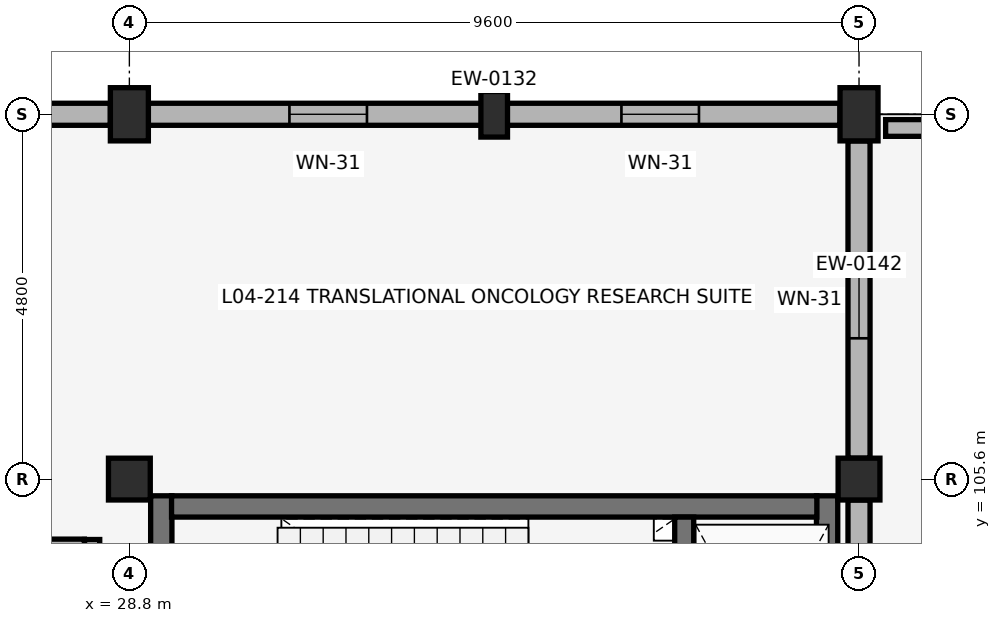
"""IFC4 building model, lengths in metres.
Left out: names, types, materials, properties, quantities, classifications, styles, units other than length and angle.
Written with IfcOpenShell. Run it as: python <this file> out.ifc"""

import sys

from ifc_helpers import new_model, si_unit, direction, frame, frame_2d, origin, origin_2d, place, context, subcontext, project, spatial, rectangle, extrude, element, fill, save


model = new_model("IFC4")
c1 = context("Model", 3, precision=1e-05, world=origin(), true_north=direction((0.0, 1.0)))
c2 = subcontext(c1, "Body", "Model", "MODEL_VIEW")
j1 = project(units=[si_unit("LENGTHUNIT", "METRE"), si_unit("PLANEANGLEUNIT", "RADIAN")], contexts=[c1])
p1 = place(None, origin())
s1 = spatial("IfcSite", under=j1, at=p1, CompositionType="ELEMENT")
p2 = place(p1, origin())
s2 = spatial("IfcBuilding", under=s1, at=p2, CompositionType="ELEMENT")
p3 = place(p2, frame((0.0, 0.0, 16.66)))
s3 = spatial("IfcBuildingStorey", under=s2, at=p3, CompositionType="ELEMENT", Elevation=16.66)
p4 = place(p3, frame((28.8, 105.6, 0.0), z_axis=(0.0, 0.0, 1.0), x_axis=(1.0, 0.0, 0.0)))
e1 = element("IfcColumn", 1, at=p4, inside=s3, PredefinedType="COLUMN", context=c2, shape_type="SweptSolid", body=[
    extrude(rectangle(XDim=0.55, YDim=0.55, at=origin_2d()), origin(), (0.0, 0.0, 1.0), 4.08),
])
p5 = place(p3, frame((28.8, 110.4, 0.0), z_axis=(0.0, 0.0, 1.0), x_axis=(1.0, 0.0, 0.0)))
e2 = element("IfcColumn", 2, at=p5, inside=s3, PredefinedType="COLUMN", context=c2, shape_type="SweptSolid", body=[
    extrude(rectangle(XDim=0.5, YDim=0.7, at=origin_2d()), origin(), (0.0, 0.0, 1.0), 4.08),
])
p6 = place(p3, frame((38.4, 105.6, 0.0), z_axis=(0.0, 0.0, 1.0), x_axis=(1.0, 0.0, 0.0)))
e3 = element("IfcColumn", 3, at=p6, inside=s3, PredefinedType="COLUMN", context=c2, shape_type="SweptSolid", body=[
    extrude(rectangle(XDim=0.55, YDim=0.55, at=origin_2d()), origin(), (0.0, 0.0, 1.0), 4.08),
])
p7 = place(p3, frame((38.4, 110.4, 0.0), z_axis=(0.0, 0.0, 1.0), x_axis=(1.0, 0.0, 0.0)))
e4 = element("IfcColumn", 4, at=p7, inside=s3, PredefinedType="COLUMN", context=c2, shape_type="SweptSolid", body=[
    extrude(rectangle(XDim=0.5, YDim=0.7, at=origin_2d()), origin(), (0.0, 0.0, 1.0), 4.08),
])
p8 = place(p3, frame((33.6, 110.4, 0.0), z_axis=(0.0, 0.0, 1.0), x_axis=(1.0, 0.0, 0.0)))
e5 = element("IfcColumn", 5, at=p8, inside=s3, PredefinedType="PILASTER", context=c2, shape_type="SweptSolid", body=[
    extrude(rectangle(XDim=0.35, YDim=0.6, at=origin_2d()), origin(), (0.0, 0.0, 1.0), 4.08),
])
p9 = place(p3, frame((28.55, 110.4, 0.0), z_axis=(0.0, 0.0, 1.0), x_axis=(-1.0, 0.0, 0.0)))
e6 = element("IfcWall", 6, at=p9, inside=s3, PredefinedType="SOLIDWALL", context=c2, shape_type="SweptSolid", body=[
    extrude(rectangle(XDim=9.1, YDim=0.29, at=frame_2d((4.55, 0.0))), origin(), (0.0, 0.0, 1.0), 3.08),
])
p10 = place(p9, frame((1.765, 0.0, 0.88)))
e7 = element("IfcOpeningElement", 7, at=p10, cuts=e6, PredefinedType="OPENING", context=c2, shape_type="SweptSolid", body=[
    extrude(rectangle(XDim=1.02, YDim=1.88, at=frame_2d((0.51, 0.94))), frame((0.0, 0.155, 0.0), z_axis=(0.0, -1.0, 0.0), x_axis=(1.0, 0.0, 0.0)), (0.0, 0.0, 1.0), 0.31),
])
p11 = place(p9, frame((4.04, 0.0, 0.88)))
e8 = element("IfcOpeningElement", 8, at=p11, cuts=e6, PredefinedType="OPENING", context=c2, shape_type="SweptSolid", body=[
    extrude(rectangle(XDim=1.02, YDim=1.88, at=frame_2d((0.51, 0.94))), frame((0.0, 0.155, 0.0), z_axis=(0.0, -1.0, 0.0), x_axis=(1.0, 0.0, 0.0)), (0.0, 0.0, 1.0), 0.31),
])
p12 = place(p9, frame((6.315, 0.0, 0.88)))
e9 = element("IfcOpeningElement", 9, at=p12, cuts=e6, PredefinedType="OPENING", context=c2, shape_type="SweptSolid", body=[
    extrude(rectangle(XDim=1.02, YDim=1.88, at=frame_2d((0.51, 0.94))), frame((0.0, 0.155, 0.0), z_axis=(0.0, -1.0, 0.0), x_axis=(1.0, 0.0, 0.0)), (0.0, 0.0, 1.0), 0.31),
])
p13 = place(p3, frame((38.15, 110.4, 0.0), z_axis=(0.0, 0.0, 1.0), x_axis=(-1.0, 0.0, 0.0)))
e10 = element("IfcWall", 10, at=p13, inside=s3, PredefinedType="SOLIDWALL", context=c2, shape_type="SweptSolid", body=[
    extrude(rectangle(XDim=9.1, YDim=0.29, at=frame_2d((4.55, 0.0))), origin(), (0.0, 0.0, 1.0), 3.08),
])
p14 = place(p13, frame((1.856, 0.0, 0.88)))
e11 = element("IfcOpeningElement", 11, at=p14, cuts=e10, PredefinedType="OPENING", context=c2, shape_type="SweptSolid", body=[
    extrude(rectangle(XDim=1.02, YDim=1.88, at=frame_2d((0.51, 0.94))), frame((0.0, 0.155, 0.0), z_axis=(0.0, -1.0, 0.0), x_axis=(1.0, 0.0, 0.0)), (0.0, 0.0, 1.0), 0.31),
])
p15 = place(p13, frame((6.224, 0.0, 0.88)))
e12 = element("IfcOpeningElement", 12, at=p15, cuts=e10, PredefinedType="OPENING", context=c2, shape_type="SweptSolid", body=[
    extrude(rectangle(XDim=1.02, YDim=1.88, at=frame_2d((0.51, 0.94))), frame((0.0, 0.155, 0.0), z_axis=(0.0, -1.0, 0.0), x_axis=(1.0, 0.0, 0.0)), (0.0, 0.0, 1.0), 0.31),
])
p16 = place(p3, frame((38.4, 98.675, 0.0), z_axis=(0.0, 0.0, 1.0), x_axis=(0.0, 1.0, 0.0)))
e13 = element("IfcWall", 13, at=p16, inside=s3, PredefinedType="SOLIDWALL", context=c2, shape_type="SweptSolid", body=[
    extrude(rectangle(XDim=6.65, YDim=0.29, at=frame_2d((3.325, 0.0))), origin(), (0.0, 0.0, 1.0), 3.08),
])
p17 = place(p3, frame((38.4, 105.875, 0.0), z_axis=(0.0, 0.0, 1.0), x_axis=(0.0, 1.0, 0.0)))
e14 = element("IfcWall", 14, at=p17, inside=s3, PredefinedType="SOLIDWALL", context=c2, shape_type="SweptSolid", body=[
    extrude(rectangle(XDim=4.175, YDim=0.29, at=frame_2d((2.087, 0.0))), origin(), (0.0, 0.0, 1.0), 3.08),
])
p18 = place(p17, frame((1.577, 0.0, 0.88)))
e15 = element("IfcOpeningElement", 15, at=p18, cuts=e14, PredefinedType="OPENING", context=c2, shape_type="SweptSolid", body=[
    extrude(rectangle(XDim=1.02, YDim=1.88, at=frame_2d((0.51, 0.94))), frame((0.0, 0.155, 0.0), z_axis=(0.0, -1.0, 0.0), x_axis=(1.0, 0.0, 0.0)), (0.0, 0.0, 1.0), 0.31),
])
p19 = place(p3, frame((38.75, 110.22, 0.0), z_axis=(0.0, 0.0, 1.0), x_axis=(1.0, 0.0, 0.0)))
e16 = element("IfcWall", 16, at=p19, inside=s3, PredefinedType="PARAPET", context=c2, shape_type="SweptSolid", body=[
    extrude(rectangle(XDim=8.9, YDim=0.22, at=frame_2d((4.45, 0.0))), origin(), (0.0, 0.0, 1.0), 1.12),
])
for number, where, z_axis, x_axis in (
    (17, (29.22, 101.3, 0.0), (0.0, 0.0, 1.0), (0.0, 1.0, 0.0)),
    (18, (37.98, 101.3, 0.0), (0.0, 0.0, 1.0), (0.0, 1.0, 0.0)),
):
    element("IfcWall", number, at=place(p3, frame(where, z_axis=z_axis, x_axis=x_axis)), inside=s3, PredefinedType="SHEAR", context=c2, shape_type="SweptSolid", body=[
        extrude(rectangle(XDim=4.08, YDim=0.28, at=frame_2d((2.04, 0.0))), origin(), (0.0, 0.0, 1.0), 3.8),
    ])
p20 = place(p3, frame((29.355, 105.24, 0.0), z_axis=(0.0, 0.0, 1.0), x_axis=(1.0, 0.0, 0.0)))
e19 = element("IfcWall", 19, at=p20, inside=s3, PredefinedType="SHEAR", context=c2, shape_type="SweptSolid", body=[
    extrude(rectangle(XDim=8.49, YDim=0.28, at=frame_2d((4.245, 0.0))), origin(), (0.0, 0.0, 1.0), 3.8),
])
p21 = place(p3, frame((36.1, 101.56, 0.0), z_axis=(0.0, 0.0, 1.0), x_axis=(0.0, 1.0, 0.0)))
e20 = element("IfcWall", 20, at=p21, inside=s3, PredefinedType="SHEAR", context=c2, shape_type="SweptSolid", body=[
    extrude(rectangle(XDim=3.54, YDim=0.25, at=frame_2d((1.77, 0.0))), origin(), (0.0, 0.0, 1.0), 3.8),
])
p22 = place(p3, frame((28.31, 98.395, 0.0), z_axis=(0.0, 0.0, 1.0), x_axis=(0.0, 1.0, 0.0)))
e21 = element("IfcWall", 21, at=p22, inside=s3, PredefinedType="PLUMBINGWALL", context=c2, shape_type="SweptSolid", body=[
    extrude(rectangle(XDim=6.41, YDim=0.2, at=frame_2d((3.205, 0.0))), origin(), (0.0, 0.0, 1.0), 3.12),
])
p23 = place(p3, frame((24.197, 104.71, 0.0), z_axis=(0.0, 0.0, 1.0), x_axis=(1.0, 0.0, 0.0)))
e22 = element("IfcWall", 22, at=p23, inside=s3, PredefinedType="PLUMBINGWALL", context=c2, shape_type="SweptSolid", body=[
    extrude(rectangle(XDim=4.011, YDim=0.2, at=frame_2d((2.005, 0.0))), origin(), (0.0, 0.0, 1.0), 3.12),
])
p24 = place(p14, origin())
e23 = element("IfcWindow", 23, at=p24, inside=s3, PartitioningType="SINGLE_PANEL", PredefinedType="WINDOW", context=c2, shape_type="SweptSolid", body=[
    extrude(rectangle(XDim=1.02, YDim=1.88, at=frame_2d((0.51, 0.94))), frame((0.0, 0.03, 0.0), z_axis=(0.0, -1.0, 0.0), x_axis=(1.0, 0.0, 0.0)), (0.0, 0.0, 1.0), 0.06),
])
fill(e11, e23)
p25 = place(p15, origin())
e24 = element("IfcWindow", 24, at=p25, inside=s3, PartitioningType="SINGLE_PANEL", PredefinedType="WINDOW", context=c2, shape_type="SweptSolid", body=[
    extrude(rectangle(XDim=1.02, YDim=1.88, at=frame_2d((0.51, 0.94))), frame((0.0, 0.03, 0.0), z_axis=(0.0, -1.0, 0.0), x_axis=(1.0, 0.0, 0.0)), (0.0, 0.0, 1.0), 0.06),
])
fill(e12, e24)
p26 = place(p18, origin())
e25 = element("IfcWindow", 25, at=p26, inside=s3, PartitioningType="SINGLE_PANEL", PredefinedType="WINDOW", context=c2, shape_type="SweptSolid", body=[
    extrude(rectangle(XDim=1.02, YDim=1.88, at=frame_2d((0.51, 0.94))), frame((0.0, 0.03, 0.0), z_axis=(0.0, -1.0, 0.0), x_axis=(1.0, 0.0, 0.0)), (0.0, 0.0, 1.0), 0.06),
])
fill(e15, e25)
save(model, sys.argv[1])
